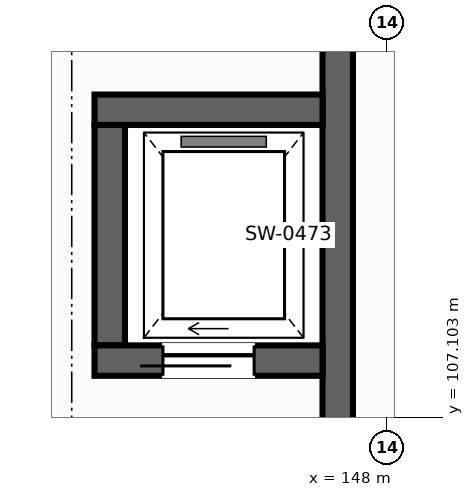
"""IFC4 building model, lengths in metres.
Left out: names, types, materials, properties, quantities, classifications, styles, units other than length and angle.
Written with IfcOpenShell. Run it as: python <this file> out.ifc"""

import sys

from ifc_helpers import new_model, si_unit, direction, frame, frame_2d, origin, place, context, subcontext, project, spatial, rectangle, extrude, element, fill, save


model = new_model("IFC4")
c1 = context("Model", 3, precision=1e-05, world=origin(), true_north=direction((0.0, 1.0)))
c2 = subcontext(c1, "Body", "Model", "MODEL_VIEW")
j1 = project(units=[si_unit("LENGTHUNIT", "METRE"), si_unit("PLANEANGLEUNIT", "RADIAN")], contexts=[c1])
p1 = place(None, origin())
s1 = spatial("IfcSite", under=j1, at=p1, CompositionType="ELEMENT")
p2 = place(p1, origin())
s2 = spatial("IfcBuilding", under=s1, at=p2, CompositionType="ELEMENT")
p3 = place(p2, frame((0.0, 0.0, 13.5)))
s3 = spatial("IfcBuildingStorey", under=s2, at=p3, CompositionType="ELEMENT", Elevation=13.5)
p4 = place(p3, frame((147.35, 107.0, 0.0), z_axis=(0.0, 0.0, 1.0), x_axis=(0.0, 1.0, 0.0)))
e1 = element("IfcWall", 1, at=p4, inside=s3, PredefinedType="SHEAR", context=c2, shape_type="SweptSolid", body=[
    extrude(rectangle(XDim=5.0, YDim=0.4, at=frame_2d((2.5, 0.0))), origin(), (0.0, 0.0, 1.0), 4.25),
])
p5 = place(p3, frame((144.35, 108.05, 0.0), z_axis=(0.0, 0.0, 1.0), x_axis=(0.0, 1.0, 0.0)))
e2 = element("IfcWall", 2, at=p5, inside=s3, PredefinedType="SHEAR", context=c2, shape_type="SweptSolid", body=[
    extrude(rectangle(XDim=2.9, YDim=0.4, at=frame_2d((1.45, 0.0))), origin(), (0.0, 0.0, 1.0), 4.25),
])
p6 = place(p3, frame((144.15, 107.85, 0.0), z_axis=(0.0, 0.0, 1.0), x_axis=(1.0, 0.0, 0.0)))
e3 = element("IfcWall", 3, at=p6, inside=s3, PredefinedType="SHEAR", context=c2, shape_type="SweptSolid", body=[
    extrude(rectangle(XDim=3.0, YDim=0.4, at=frame_2d((1.5, 0.0))), origin(), (0.0, 0.0, 1.0), 4.25),
])
p7 = place(p6, frame((0.9, 0.0, 0.0)))
e4 = element("IfcOpeningElement", 4, at=p7, cuts=e3, PredefinedType="OPENING", context=c2, shape_type="SweptSolid", body=[
    extrude(rectangle(XDim=1.2, YDim=2.2, at=frame_2d((0.6, 1.1))), frame((0.0, 0.21, 0.0), z_axis=(0.0, -1.0, 0.0), x_axis=(1.0, 0.0, 0.0)), (0.0, 0.0, 1.0), 0.42),
])
p8 = place(p3, frame((144.15, 111.15, 0.0), z_axis=(0.0, 0.0, 1.0), x_axis=(1.0, 0.0, 0.0)))
e5 = element("IfcWall", 5, at=p8, inside=s3, PredefinedType="SHEAR", context=c2, shape_type="SweptSolid", body=[
    extrude(rectangle(XDim=3.0, YDim=0.4, at=frame_2d((1.5, 0.0))), origin(), (0.0, 0.0, 1.0), 4.25),
])
p9 = place(p7, origin())
e6 = element("IfcDoor", 6, at=p9, inside=s3, OperationType="SLIDING_TO_LEFT", PredefinedType="DOOR", context=c2, shape_type="SweptSolid", body=[
    extrude(rectangle(XDim=1.2, YDim=2.2, at=frame_2d((0.6, 1.1))), frame((0.0, 0.025, 0.0), z_axis=(0.0, -1.0, 0.0), x_axis=(1.0, 0.0, 0.0)), (0.0, 0.0, 1.0), 0.05),
])
fill(e4, e6)
save(model, sys.argv[1])
